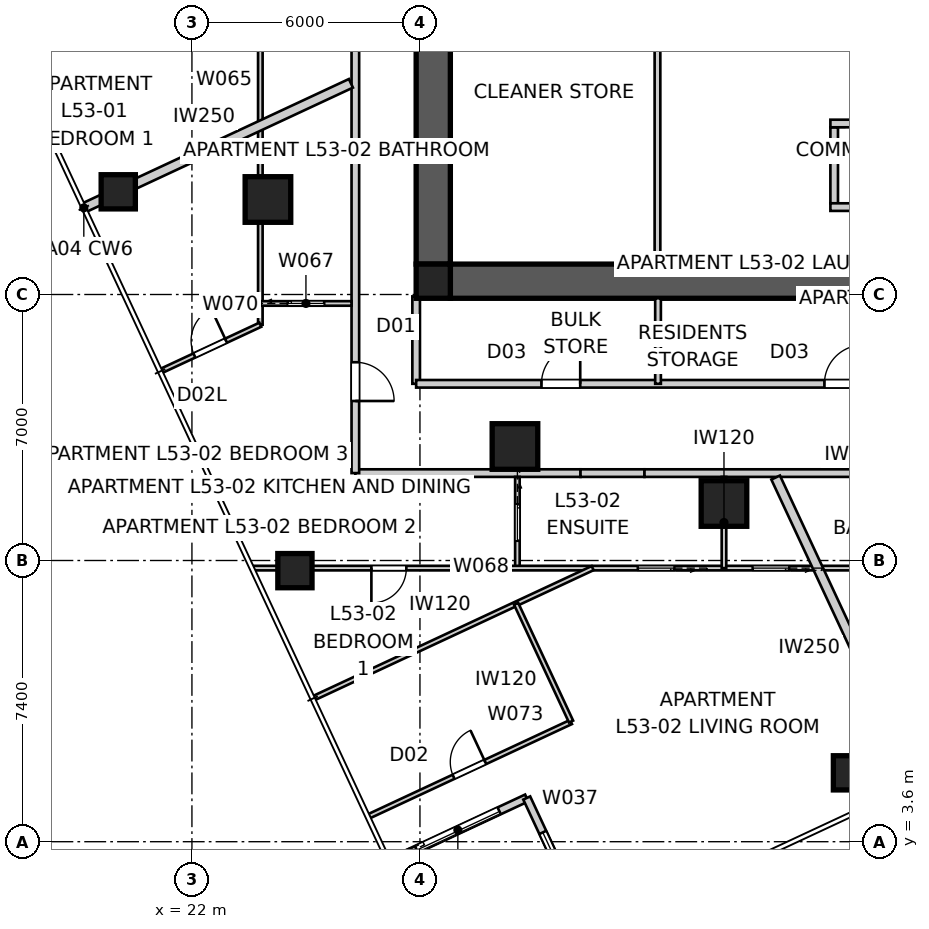
"""IFC4 building model, lengths in metres.
Left out: names, types, materials, properties, quantities, classifications, styles, units other than length and angle.
Written with IfcOpenShell. Run it as: python <this file> out.ifc"""

import sys

from ifc_helpers import new_model, si_unit, direction, frame, frame_2d, origin, origin_2d, place, context, subcontext, project, spatial, polyline, rectangle, outline, extrude, element, fill, save


model = new_model("IFC4")
c1 = context("Model", 3, precision=1e-05, world=origin(), true_north=direction((0.0, 1.0)))
c2 = subcontext(c1, "Body", "Model", "MODEL_VIEW")
j1 = project(units=[si_unit("LENGTHUNIT", "METRE"), si_unit("PLANEANGLEUNIT", "RADIAN")], contexts=[c1])
p1 = place(None, origin())
s1 = spatial("IfcSite", under=j1, at=p1, CompositionType="ELEMENT")
p2 = place(p1, origin())
s2 = spatial("IfcBuilding", under=s1, at=p2, CompositionType="ELEMENT")
p3 = place(p2, frame((0.0, 0.0, 193.0)))
s3 = spatial("IfcBuildingStorey", under=s2, at=p3, CompositionType="ELEMENT", Elevation=193.0)
p4 = place(p3, frame((51.2, 18.35, 0.0), z_axis=(0.0, 0.0, 1.0), x_axis=(-1.0, 0.0, 0.0)))
e1 = element("IfcWall", 1, at=p4, inside=s3, PredefinedType="SHEAR", context=c2, shape_type="SweptSolid", body=[
    extrude(outline(polyline([(0.0, -0.45), (22.4, -0.45), (22.4, -0.025), (22.85, -0.025), (22.85, 0.025), (22.4, 0.025), (22.4, 0.45), (0.0, 0.45), (0.0, 0.025), (-0.45, 0.025), (-0.45, -0.025), (0.0, -0.025), (0.0, -0.45)])), origin(), (0.0, 0.0, 1.0), 3.4),
])
p5 = place(p3, frame((28.35, 41.2, 0.0), z_axis=(0.0, 0.0, 1.0), x_axis=(0.0, -1.0, 0.0)))
e2 = element("IfcWall", 2, at=p5, inside=s3, PredefinedType="SHEAR", context=c2, shape_type="SweptSolid", body=[
    extrude(outline(polyline([(0.0, -0.45), (22.4, -0.45), (22.4, -0.025), (22.85, -0.025), (22.85, 0.025), (22.4, 0.025), (22.4, 0.45), (0.0, 0.45), (0.0, 0.025), (-0.45, 0.025), (-0.45, -0.025), (0.0, -0.025), (0.0, -0.45)])), origin(), (0.0, 0.0, 1.0), 3.4),
])
p6 = place(p5, frame((11.14, 0.0, 0.0)))
e3 = element("IfcOpeningElement", 3, at=p6, cuts=e2, PredefinedType="OPENING", context=c2, shape_type="SweptSolid", body=[
    extrude(rectangle(XDim=1.02, YDim=2.4, at=frame_2d((0.51, 1.2))), frame((0.0, 0.46, 0.0), z_axis=(0.0, -1.0, 0.0), x_axis=(1.0, 0.0, 0.0)), (0.0, 0.0, 1.0), 0.92),
])
p7 = place(p3, frame((38.9, 22.4, 0.0), z_axis=(0.0, 0.0, 1.0), x_axis=(0.0, -1.0, 0.0)))
e4 = element("IfcWall", 4, at=p7, inside=s3, PredefinedType="SOLIDWALL", context=c2, shape_type="SweptSolid", body=[
    extrude(rectangle(XDim=2.0, YDim=0.2, at=frame_2d((1.0, 0.0))), origin(), (0.0, 0.0, 1.0), 3.4),
])
for number, where, z_axis, x_axis in (
    (5, (38.8, 22.5, 0.0), (0.0, 0.0, 1.0), (1.0, 0.0, 0.0)),
    (6, (38.8, 20.3, 0.0), (0.0, 0.0, 1.0), (1.0, 0.0, 0.0)),
):
    element("IfcWall", number, at=place(p3, frame(where, z_axis=z_axis, x_axis=x_axis)), inside=s3, PredefinedType="SOLIDWALL", context=c2, shape_type="SweptSolid", body=[
        extrude(rectangle(XDim=2.4, YDim=0.2, at=frame_2d((1.2, 0.0))), origin(), (0.0, 0.0, 1.0), 3.4),
    ])
for number, where, z_axis, x_axis in (
    (7, (28.35, 18.35, 0.0), (0.0, 0.0, 1.0), (1.0, 0.0, 0.0)),
    (8, (39.328, 5.412, 0.0), (0.0, 0.0, 1.0), (1.0, 0.0, 0.0)),
    (9, (20.061, 20.702, 0.0), (0.0, 0.0, 1.0), (1.0, 0.0, 0.0)),
    (10, (24.71, 10.733, 0.0), (0.0, 0.0, 1.0), (1.0, 0.0, 0.0)),
):
    element("IfcColumn", number, at=place(p3, frame(where, z_axis=z_axis, x_axis=x_axis)), inside=s3, PredefinedType="COLUMN", context=c2, shape_type="SweptSolid", body=[
        extrude(rectangle(XDim=0.9, YDim=0.9, at=origin_2d()), origin(), (0.0, 0.0, 1.0), 3.4),
    ])
for number, where, z_axis, x_axis in (
    (11, (24.0, 20.5, 0.0), (0.0, 0.0, 1.0), (1.0, 0.0, 0.0)),
    (12, (30.5, 14.0, 0.0), (0.0, 0.0, 1.0), (1.0, 0.0, 0.0)),
    (13, (36.0, 12.5, 0.0), (0.0, 0.0, 1.0), (1.0, 0.0, 0.0)),
):
    element("IfcColumn", number, at=place(p3, frame(where, z_axis=z_axis, x_axis=x_axis)), inside=s3, PredefinedType="COLUMN", context=c2, shape_type="SweptSolid", body=[
        extrude(rectangle(XDim=1.2, YDim=1.2, at=origin_2d()), origin(), (0.0, 0.0, 1.0), 3.4),
    ])
p8 = place(p3, frame((27.185, 3.06, 0.0), z_axis=(0.0, 0.0, 1.0), x_axis=(0.906289140828, 0.422658246362, 0.0)))
e14 = element("IfcWall", 14, at=p8, inside=s3, PredefinedType="SOLIDWALL", context=c2, shape_type="SweptSolid", body=[
    extrude(rectangle(XDim=4.0, YDim=0.2, at=frame_2d((2.0, 0.0))), origin(), (0.0, 0.0, 1.0), 3.25),
])
p9 = place(p8, frame((0.8, 0.0, 0.0)))
e15 = element("IfcOpeningElement", 15, at=p9, cuts=e14, PredefinedType="OPENING", context=c2, shape_type="SweptSolid", body=[
    extrude(rectangle(XDim=2.4, YDim=2.1, at=frame_2d((1.2, 1.05))), frame((0.0, 0.11, 0.0), z_axis=(0.0, -1.0, 0.0), x_axis=(1.0, 0.0, 0.0)), (0.0, 0.0, 1.0), 0.22),
])
p10 = place(p3, frame((30.81, 4.75, 0.0), z_axis=(0.0, 0.0, 1.0), x_axis=(0.422658246362, -0.906289140828, 0.0)))
e16 = element("IfcWall", 16, at=p10, inside=s3, PredefinedType="SOLIDWALL", context=c2, shape_type="SweptSolid", body=[
    extrude(rectangle(XDim=4.0, YDim=0.2, at=frame_2d((2.0, 0.0))), origin(), (0.0, 0.0, 1.0), 3.25),
])
p11 = place(p10, frame((1.0, 0.0, 0.45)))
e17 = element("IfcOpeningElement", 17, at=p11, cuts=e16, PredefinedType="OPENING", context=c2, shape_type="SweptSolid", body=[
    extrude(rectangle(XDim=2.0, YDim=1.8, at=frame_2d((1.0, 0.9))), frame((0.0, 0.11, 0.0), z_axis=(0.0, -1.0, 0.0), x_axis=(1.0, 0.0, 0.0)), (0.0, 0.0, 1.0), 0.22),
])
p12 = place(p3, frame((26.3, 13.3, 0.0), z_axis=(0.0, 0.0, 1.0), x_axis=(1.0, 0.0, 0.0)))
e18 = element("IfcWall", 18, at=p12, inside=s3, PredefinedType="PARTITIONING", context=c2, shape_type="SweptSolid", body=[
    extrude(rectangle(XDim=5.925, YDim=0.2, at=frame_2d((2.962, 0.0))), origin(), (0.0, 0.0, 1.0), 3.25),
])
p13 = place(p3, frame((32.225, 13.3, 0.0), z_axis=(0.0, 0.0, 1.0), x_axis=(1.0, 0.0, 0.0)))
e19 = element("IfcWall", 19, at=p13, inside=s3, PredefinedType="PARTITIONING", context=c2, shape_type="SweptSolid", body=[
    extrude(rectangle(XDim=1.684, YDim=0.2, at=frame_2d((0.842, 0.0))), origin(), (0.0, 0.0, 1.0), 2.55),
])
p14 = place(p3, frame((33.908, 13.3, 0.0), z_axis=(0.0, 0.0, 1.0), x_axis=(1.0, 0.0, 0.0)))
e20 = element("IfcWall", 20, at=p14, inside=s3, PredefinedType="PARTITIONING", context=c2, shape_type="SweptSolid", body=[
    extrude(rectangle(XDim=12.183, YDim=0.2, at=frame_2d((6.092, 0.0))), origin(), (0.0, 0.0, 1.0), 3.25),
])
p15 = place(p3, frame((26.3, 47.1, 0.0), z_axis=(0.0, 0.0, 1.0), x_axis=(0.0, -1.0, 0.0)))
e21 = element("IfcWall", 21, at=p15, inside=s3, PredefinedType="PARTITIONING", context=c2, shape_type="SweptSolid", body=[
    extrude(rectangle(XDim=33.8, YDim=0.2, at=frame_2d((16.9, 0.0))), origin(), (0.0, 0.0, 1.0), 3.25),
])
p16 = place(p15, frame((15.449, 0.0, 0.0)))
e22 = element("IfcOpeningElement", 22, at=p16, cuts=e21, PredefinedType="OPENING", context=c2, shape_type="SweptSolid", body=[
    extrude(rectangle(XDim=1.02, YDim=2.34, at=frame_2d((0.51, 1.17))), frame((0.0, 0.11, 0.0), z_axis=(0.0, -1.0, 0.0), x_axis=(1.0, 0.0, 0.0)), (0.0, 0.0, 1.0), 0.22),
])
p17 = place(p15, frame((30.883, 0.0, 0.0)))
e23 = element("IfcOpeningElement", 23, at=p17, cuts=e21, PredefinedType="OPENING", context=c2, shape_type="SweptSolid", body=[
    extrude(rectangle(XDim=1.02, YDim=2.34, at=frame_2d((0.51, 1.17))), frame((0.0, 0.11, 0.0), z_axis=(0.0, -1.0, 0.0), x_axis=(1.0, 0.0, 0.0)), (0.0, 0.0, 1.0), 0.22),
])
p18 = place(p3, frame((41.11, 5.14, 0.0), z_axis=(0.0, 0.0, 1.0), x_axis=(-0.42262942879, 0.906302579672, 0.0)))
e24 = element("IfcWall", 24, at=p18, inside=s3, PredefinedType="PARTITIONING", context=c2, shape_type="SweptSolid", body=[
    extrude(rectangle(XDim=8.875, YDim=0.25, at=frame_2d((4.438, 0.0))), origin(), (0.0, 0.0, 1.0), 3.25),
])
p19 = place(p3, frame((19.155, 20.28, 0.0), z_axis=(0.0, 0.0, 1.0), x_axis=(0.906308569177, 0.422616584432, 0.0)))
e25 = element("IfcWall", 25, at=p19, inside=s3, PredefinedType="PARTITIONING", context=c2, shape_type="SweptSolid", body=[
    extrude(rectangle(XDim=7.755, YDim=0.25, at=frame_2d((3.877, 0.0))), origin(), (0.0, 0.0, 1.0), 3.25),
])
p20 = place(p3, frame((34.25, 18.8, 0.0), z_axis=(0.0, 0.0, 1.0), x_axis=(0.0, 1.0, 0.0)))
e26 = element("IfcWall", 26, at=p20, inside=s3, PredefinedType="SOLIDWALL", context=c2, shape_type="SweptSolid", body=[
    extrude(rectangle(XDim=5.9, YDim=0.15, at=frame_2d((2.95, 0.0))), origin(), (0.0, 0.0, 1.0), 3.25),
])
p21 = place(p3, frame((27.9, 17.95, 0.0), z_axis=(0.0, 0.0, 1.0), x_axis=(0.0, -1.0, 0.0)))
e27 = element("IfcWall", 27, at=p21, inside=s3, PredefinedType="PARTITIONING", context=c2, shape_type="SweptSolid", body=[
    extrude(rectangle(XDim=2.3, YDim=0.2, at=frame_2d((1.15, 0.0))), origin(), (0.0, 0.0, 1.0), 3.25),
])
p22 = place(p3, frame((27.9, 15.65, 0.0), z_axis=(0.0, 0.0, 1.0), x_axis=(1.0, 0.0, 0.0)))
e28 = element("IfcWall", 28, at=p22, inside=s3, PredefinedType="PARTITIONING", context=c2, shape_type="SweptSolid", body=[
    extrude(rectangle(XDim=24.2, YDim=0.2, at=frame_2d((12.1, 0.0))), origin(), (0.0, 0.0, 1.0), 3.25),
])
p23 = place(p22, frame((10.743, 0.0, 0.0)))
e29 = element("IfcOpeningElement", 29, at=p23, cuts=e28, PredefinedType="OPENING", context=c2, shape_type="SweptSolid", body=[
    extrude(rectangle(XDim=1.02, YDim=2.1, at=frame_2d((0.51, 1.05))), frame((0.0, 0.11, 0.0), z_axis=(0.0, -1.0, 0.0), x_axis=(1.0, 0.0, 0.0)), (0.0, 0.0, 1.0), 0.22),
])
p24 = place(p22, frame((19.636, 0.0, 0.0)))
e30 = element("IfcOpeningElement", 30, at=p24, cuts=e28, PredefinedType="OPENING", context=c2, shape_type="SweptSolid", body=[
    extrude(rectangle(XDim=1.02, YDim=2.1, at=frame_2d((0.51, 1.05))), frame((0.0, 0.11, 0.0), z_axis=(0.0, -1.0, 0.0), x_axis=(1.0, 0.0, 0.0)), (0.0, 0.0, 1.0), 0.22),
])
p25 = place(p22, frame((3.297, 0.0, 0.0)))
e31 = element("IfcOpeningElement", 31, at=p25, cuts=e28, PredefinedType="OPENING", context=c2, shape_type="SweptSolid", body=[
    extrude(rectangle(XDim=1.02, YDim=2.1, at=frame_2d((0.51, 1.05))), frame((0.0, 0.11, 0.0), z_axis=(0.0, -1.0, 0.0), x_axis=(1.0, 0.0, 0.0)), (0.0, 0.0, 1.0), 0.22),
])
p26 = place(p3, frame((34.265, 15.65, 0.0), z_axis=(0.0, 0.0, 1.0), x_axis=(0.0, 1.0, 0.0)))
e32 = element("IfcWall", 32, at=p26, inside=s3, PredefinedType="SOLIDWALL", context=c2, shape_type="SweptSolid", body=[
    extrude(rectangle(XDim=2.25, YDim=0.15, at=frame_2d((1.125, 0.0))), origin(), (0.0, 0.0, 1.0), 2.796),
])
p27 = place(p3, frame((23.8, 17.205, 0.0), z_axis=(0.0, 0.0, 1.0), x_axis=(0.0, 1.0, 0.0)))
e33 = element("IfcWall", 33, at=p27, inside=s3, PredefinedType="PARTITIONING", context=c2, shape_type="SweptSolid", body=[
    extrude(rectangle(XDim=30.574, YDim=0.12, at=frame_2d((15.287, 0.0))), origin(), (0.0, 0.0, 1.0), 2.55),
])
p28 = place(p27, frame((12.857, 0.0, 0.0)))
e34 = element("IfcOpeningElement", 34, at=p28, cuts=e33, PredefinedType="OPENING", context=c2, shape_type="SweptSolid", body=[
    extrude(rectangle(XDim=0.92, YDim=2.34, at=frame_2d((0.46, 1.17))), frame((0.0, 0.07, 0.0), z_axis=(0.0, -1.0, 0.0), x_axis=(1.0, 0.0, 0.0)), (0.0, 0.0, 1.0), 0.14),
])
p29 = place(p27, frame((28.042, 0.0, 0.0)))
e35 = element("IfcOpeningElement", 35, at=p29, cuts=e33, PredefinedType="OPENING", context=c2, shape_type="SweptSolid", body=[
    extrude(rectangle(XDim=0.92, YDim=2.34, at=frame_2d((0.46, 1.17))), frame((0.0, 0.07, 0.0), z_axis=(0.0, -1.0, 0.0), x_axis=(1.0, 0.0, 0.0)), (0.0, 0.0, 1.0), 0.14),
])
p30 = place(p27, frame((20.655, 0.0, 0.0)))
e36 = element("IfcOpeningElement", 36, at=p30, cuts=e33, PredefinedType="OPENING", context=c2, shape_type="SweptSolid", body=[
    extrude(rectangle(XDim=0.96, YDim=2.1, at=frame_2d((0.48, 1.05))), frame((0.0, 0.07, 0.0), z_axis=(0.0, -1.0, 0.0), x_axis=(1.0, 0.0, 0.0)), (0.0, 0.0, 1.0), 0.14),
])
p31 = place(p3, frame((23.8, 17.765, 0.0), z_axis=(0.0, 0.0, 1.0), x_axis=(1.0, 0.0, 0.0)))
e37 = element("IfcWall", 37, at=p31, inside=s3, PredefinedType="PARTITIONING", context=c2, shape_type="SweptSolid", body=[
    extrude(rectangle(XDim=2.4, YDim=0.12, at=frame_2d((1.2, 0.0))), origin(), (0.0, 0.0, 1.0), 3.25),
])
p32 = place(p31, frame((0.72, 0.0, 0.0)))
e38 = element("IfcOpeningElement", 38, at=p32, cuts=e37, PredefinedType="OPENING", context=c2, shape_type="SweptSolid", body=[
    extrude(rectangle(XDim=0.96, YDim=2.1, at=frame_2d((0.48, 1.05))), frame((0.0, 0.07, 0.0), z_axis=(0.0, -1.0, 0.0), x_axis=(1.0, 0.0, 0.0)), (0.0, 0.0, 1.0), 0.14),
])
p33 = place(p3, frame((30.564, 13.2, 0.0), z_axis=(0.0, 0.0, 1.0), x_axis=(0.0, -1.0, 0.0)))
e39 = element("IfcWall", 39, at=p33, inside=s3, PredefinedType="PARTITIONING", context=c2, shape_type="SweptSolid", body=[
    extrude(rectangle(XDim=2.4, YDim=0.12, at=frame_2d((1.2, 0.0))), origin(), (0.0, 0.0, 1.0), 3.25),
])
p34 = place(p33, frame((0.72, 0.0, 0.0)))
e40 = element("IfcOpeningElement", 40, at=p34, cuts=e39, PredefinedType="OPENING", context=c2, shape_type="SweptSolid", body=[
    extrude(rectangle(XDim=0.96, YDim=2.1, at=frame_2d((0.48, 1.05))), frame((0.0, 0.07, 0.0), z_axis=(0.0, -1.0, 0.0), x_axis=(1.0, 0.0, 0.0)), (0.0, 0.0, 1.0), 0.14),
])
p35 = place(p3, frame((53.208, 10.8, 0.0), z_axis=(0.0, 0.0, 1.0), x_axis=(-1.0, 0.0, 0.0)))
e41 = element("IfcWall", 41, at=p35, inside=s3, PredefinedType="PARTITIONING", context=c2, shape_type="SweptSolid", body=[
    extrude(rectangle(XDim=29.593, YDim=0.12, at=frame_2d((14.796, 0.0))), origin(), (0.0, 0.0, 1.0), 3.25),
])
p36 = place(p35, frame((6.074, 0.0, 0.0)))
e42 = element("IfcOpeningElement", 42, at=p36, cuts=e41, PredefinedType="OPENING", context=c2, shape_type="SweptSolid", body=[
    extrude(rectangle(XDim=0.92, YDim=2.34, at=frame_2d((0.46, 1.17))), frame((0.0, 0.07, 0.0), z_axis=(0.0, -1.0, 0.0), x_axis=(1.0, 0.0, 0.0)), (0.0, 0.0, 1.0), 0.14),
])
p37 = place(p35, frame((25.566, 0.0, 0.0)))
e43 = element("IfcOpeningElement", 43, at=p37, cuts=e41, PredefinedType="OPENING", context=c2, shape_type="SweptSolid", body=[
    extrude(rectangle(XDim=0.92, YDim=2.34, at=frame_2d((0.46, 1.17))), frame((0.0, 0.07, 0.0), z_axis=(0.0, -1.0, 0.0), x_axis=(1.0, 0.0, 0.0)), (0.0, 0.0, 1.0), 0.14),
])
p38 = place(p35, frame((18.515, 0.0, 0.0)))
e44 = element("IfcOpeningElement", 44, at=p38, cuts=e41, PredefinedType="OPENING", context=c2, shape_type="SweptSolid", body=[
    extrude(rectangle(XDim=0.96, YDim=2.1, at=frame_2d((0.48, 1.05))), frame((0.0, 0.07, 0.0), z_axis=(0.0, -1.0, 0.0), x_axis=(1.0, 0.0, 0.0)), (0.0, 0.0, 1.0), 0.14),
])
p39 = place(p35, frame((15.493, 0.0, 0.0)))
e45 = element("IfcOpeningElement", 45, at=p39, cuts=e41, PredefinedType="OPENING", context=c2, shape_type="SweptSolid", body=[
    extrude(rectangle(XDim=0.96, YDim=2.1, at=frame_2d((0.48, 1.05))), frame((0.0, 0.07, 0.0), z_axis=(0.0, -1.0, 0.0), x_axis=(1.0, 0.0, 0.0)), (0.0, 0.0, 1.0), 0.14),
])
p40 = place(p35, frame((11.609, 0.0, 0.0)))
e46 = element("IfcOpeningElement", 46, at=p40, cuts=e41, PredefinedType="OPENING", context=c2, shape_type="SweptSolid", body=[
    extrude(rectangle(XDim=0.96, YDim=2.1, at=frame_2d((0.48, 1.05))), frame((0.0, 0.07, 0.0), z_axis=(0.0, -1.0, 0.0), x_axis=(1.0, 0.0, 0.0)), (0.0, 0.0, 1.0), 0.14),
])
p41 = place(p3, frame((21.199, 15.992, 0.0), z_axis=(0.0, 0.0, 1.0), x_axis=(0.906291760669, 0.422652628697, 0.0)))
e47 = element("IfcWall", 47, at=p41, inside=s3, PredefinedType="PARTITIONING", context=c2, shape_type="SweptSolid", body=[
    extrude(rectangle(XDim=2.87, YDim=0.12, at=frame_2d((1.435, 0.0))), origin(), (0.0, 0.0, 1.0), 3.25),
])
p42 = place(p41, frame((0.955, 0.0, 0.0)))
e48 = element("IfcOpeningElement", 48, at=p42, cuts=e47, PredefinedType="OPENING", context=c2, shape_type="SweptSolid", body=[
    extrude(rectangle(XDim=0.92, YDim=2.1, at=frame_2d((0.46, 1.05))), frame((0.0, 0.07, 0.0), z_axis=(0.0, -1.0, 0.0), x_axis=(1.0, 0.0, 0.0)), (0.0, 0.0, 1.0), 0.14),
])
p43 = place(p3, frame((36.0, 13.2, 0.0), z_axis=(0.0, 0.0, 1.0), x_axis=(0.0, -1.0, 0.0)))
e49 = element("IfcWall", 49, at=p43, inside=s3, PredefinedType="PARTITIONING", context=c2, shape_type="SweptSolid", body=[
    extrude(rectangle(XDim=2.4, YDim=0.12, at=frame_2d((1.2, 0.0))), origin(), (0.0, 0.0, 1.0), 3.25),
])
p44 = place(p3, frame((25.213, 7.382, 0.0), z_axis=(0.0, 0.0, 1.0), x_axis=(0.906311876708, 0.422609491301, 0.0)))
e50 = element("IfcWall", 50, at=p44, inside=s3, PredefinedType="PARTITIONING", context=c2, shape_type="SweptSolid", body=[
    extrude(rectangle(XDim=8.088, YDim=0.12, at=frame_2d((4.044, 0.0))), origin(), (0.0, 0.0, 1.0), 3.25),
])
p45 = place(p3, frame((26.663, 4.273, 0.0), z_axis=(0.0, 0.0, 1.0), x_axis=(0.906259747144, 0.42272126834, 0.0)))
e51 = element("IfcWall", 51, at=p45, inside=s3, PredefinedType="PARTITIONING", context=c2, shape_type="SweptSolid", body=[
    extrude(rectangle(XDim=5.861, YDim=0.12, at=frame_2d((2.93, 0.0))), origin(), (0.0, 0.0, 1.0), 3.25),
])
p46 = place(p45, frame((2.45, 0.0, 0.0)))
e52 = element("IfcOpeningElement", 52, at=p46, cuts=e51, PredefinedType="OPENING", context=c2, shape_type="SweptSolid", body=[
    extrude(rectangle(XDim=0.92, YDim=2.34, at=frame_2d((0.46, 1.17))), frame((0.0, 0.07, 0.0), z_axis=(0.0, -1.0, 0.0), x_axis=(1.0, 0.0, 0.0)), (0.0, 0.0, 1.0), 0.14),
])
p47 = place(p3, frame((31.976, 6.761, 0.0), z_axis=(0.0, 0.0, 1.0), x_axis=(-0.422608022988, 0.906312561375, 0.0)))
e53 = element("IfcWall", 53, at=p47, inside=s3, PredefinedType="PARTITIONING", context=c2, shape_type="SweptSolid", body=[
    extrude(rectangle(XDim=3.421, YDim=0.12, at=frame_2d((1.71, 0.0))), origin(), (0.0, 0.0, 1.0), 3.25),
])
p48 = place(p9, origin())
e54 = element("IfcDoor", 54, at=p48, inside=s3, OperationType="SLIDING_TO_LEFT", PredefinedType="DOOR", context=c2, shape_type="SweptSolid", body=[
    extrude(rectangle(XDim=2.4, YDim=2.1, at=frame_2d((1.2, 1.05))), frame((0.0, 0.025, 0.0), z_axis=(0.0, -1.0, 0.0), x_axis=(1.0, 0.0, 0.0)), (0.0, 0.0, 1.0), 0.05),
])
fill(e15, e54)
p49 = place(p11, origin())
e55 = element("IfcWindow", 55, at=p49, inside=s3, PartitioningType="SINGLE_PANEL", PredefinedType="WINDOW", context=c2, shape_type="SweptSolid", body=[
    extrude(rectangle(XDim=2.0, YDim=1.8, at=frame_2d((1.0, 0.9))), frame((0.0, 0.03, 0.0), z_axis=(0.0, -1.0, 0.0), x_axis=(1.0, 0.0, 0.0)), (0.0, 0.0, 1.0), 0.06),
])
fill(e17, e55)
p50 = place(p23, origin())
e56 = element("IfcDoor", 56, at=p50, inside=s3, OperationType="SINGLE_SWING_RIGHT", PredefinedType="DOOR", context=c2, shape_type="SweptSolid", body=[
    extrude(rectangle(XDim=1.02, YDim=2.1, at=frame_2d((0.51, 1.05))), frame((0.0, 0.025, 0.0), z_axis=(0.0, -1.0, 0.0), x_axis=(1.0, 0.0, 0.0)), (0.0, 0.0, 1.0), 0.05),
])
fill(e29, e56)
p51 = place(p25, origin())
e57 = element("IfcDoor", 57, at=p51, inside=s3, OperationType="SINGLE_SWING_RIGHT", PredefinedType="DOOR", context=c2, shape_type="SweptSolid", body=[
    extrude(rectangle(XDim=1.02, YDim=2.1, at=frame_2d((0.51, 1.05))), frame((0.0, 0.025, 0.0), z_axis=(0.0, -1.0, 0.0), x_axis=(1.0, 0.0, 0.0)), (0.0, 0.0, 1.0), 0.05),
])
fill(e31, e57)
p52 = place(p17, origin())
e58 = element("IfcDoor", 58, at=p52, inside=s3, OperationType="SINGLE_SWING_RIGHT", PredefinedType="DOOR", context=c2, shape_type="SweptSolid", body=[
    extrude(rectangle(XDim=1.02, YDim=2.34, at=frame_2d((0.51, 1.17))), frame((0.0, 0.025, 0.0), z_axis=(0.0, -1.0, 0.0), x_axis=(1.0, 0.0, 0.0)), (0.0, 0.0, 1.0), 0.05),
])
fill(e23, e58)
p53 = place(p37, origin())
e59 = element("IfcDoor", 59, at=p53, inside=s3, OperationType="SINGLE_SWING_RIGHT", PredefinedType="DOOR", context=c2, shape_type="SweptSolid", body=[
    extrude(rectangle(XDim=0.92, YDim=2.34, at=frame_2d((0.46, 1.17))), frame((0.0, 0.025, 0.0), z_axis=(0.0, -1.0, 0.0), x_axis=(1.0, 0.0, 0.0)), (0.0, 0.0, 1.0), 0.05),
])
fill(e43, e59)
p54 = place(p42, origin())
e60 = element("IfcDoor", 60, at=p54, inside=s3, OperationType="SINGLE_SWING_RIGHT", PredefinedType="DOOR", context=c2, shape_type="SweptSolid", body=[
    extrude(rectangle(XDim=0.92, YDim=2.1, at=frame_2d((0.46, 1.05))), frame((0.0, 0.025, 0.0), z_axis=(0.0, -1.0, 0.0), x_axis=(1.0, 0.0, 0.0)), (0.0, 0.0, 1.0), 0.05),
])
fill(e48, e60)
p55 = place(p32, origin())
e61 = element("IfcDoor", 61, at=p55, inside=s3, OperationType="SLIDING_TO_LEFT", PredefinedType="DOOR", context=c2, shape_type="SweptSolid", body=[
    extrude(rectangle(XDim=0.96, YDim=2.1, at=frame_2d((0.48, 1.05))), frame((0.0, 0.025, 0.0), z_axis=(0.0, -1.0, 0.0), x_axis=(1.0, 0.0, 0.0)), (0.0, 0.0, 1.0), 0.05),
])
fill(e38, e61)
p56 = place(p34, origin())
e62 = element("IfcDoor", 62, at=p56, inside=s3, OperationType="SLIDING_TO_LEFT", PredefinedType="DOOR", context=c2, shape_type="SweptSolid", body=[
    extrude(rectangle(XDim=0.96, YDim=2.1, at=frame_2d((0.48, 1.05))), frame((0.0, 0.025, 0.0), z_axis=(0.0, -1.0, 0.0), x_axis=(1.0, 0.0, 0.0)), (0.0, 0.0, 1.0), 0.05),
])
fill(e40, e62)
p57 = place(p38, origin())
e63 = element("IfcDoor", 63, at=p57, inside=s3, OperationType="SLIDING_TO_LEFT", PredefinedType="DOOR", context=c2, shape_type="SweptSolid", body=[
    extrude(rectangle(XDim=0.96, YDim=2.1, at=frame_2d((0.48, 1.05))), frame((0.0, 0.025, 0.0), z_axis=(0.0, -1.0, 0.0), x_axis=(1.0, 0.0, 0.0)), (0.0, 0.0, 1.0), 0.05),
])
fill(e44, e63)
p58 = place(p46, origin())
e64 = element("IfcDoor", 64, at=p58, inside=s3, OperationType="SINGLE_SWING_RIGHT", PredefinedType="DOOR", context=c2, shape_type="SweptSolid", body=[
    extrude(rectangle(XDim=0.92, YDim=2.34, at=frame_2d((0.46, 1.17))), frame((0.0, 0.025, 0.0), z_axis=(0.0, -1.0, 0.0), x_axis=(1.0, 0.0, 0.0)), (0.0, 0.0, 1.0), 0.05),
])
fill(e52, e64)
p59 = place(p39, origin())
e65 = element("IfcDoor", 65, at=p59, inside=s3, OperationType="SLIDING_TO_LEFT", PredefinedType="DOOR", context=c2, shape_type="SweptSolid", body=[
    extrude(rectangle(XDim=0.96, YDim=2.1, at=frame_2d((0.48, 1.05))), frame((0.0, 0.025, 0.0), z_axis=(0.0, -1.0, 0.0), x_axis=(1.0, 0.0, 0.0)), (0.0, 0.0, 1.0), 0.05),
])
fill(e45, e65)
save(model, sys.argv[1])
